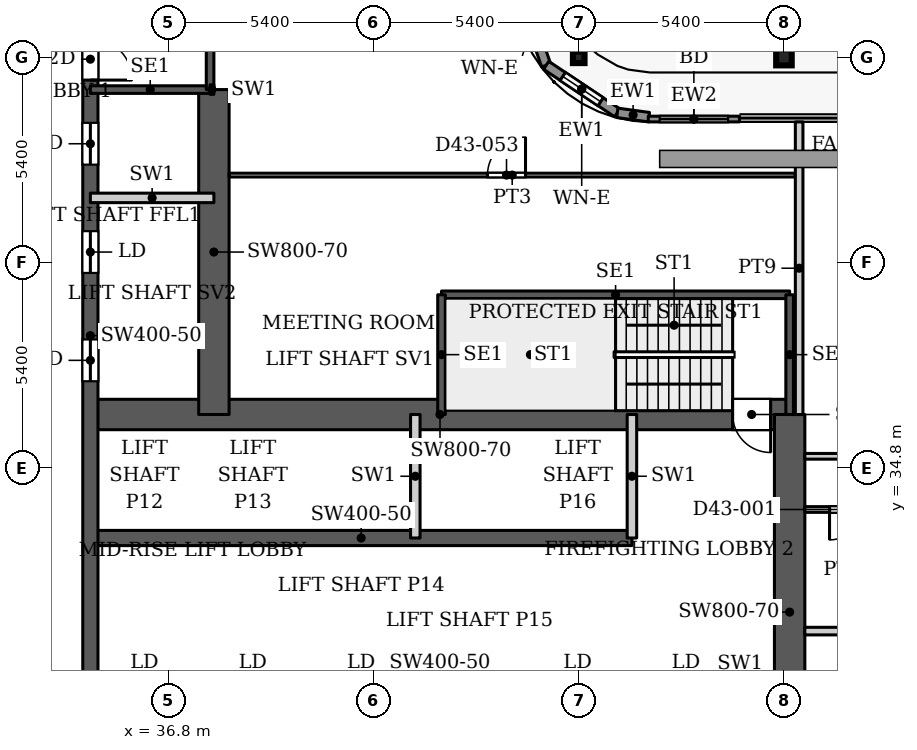
"""IFC4 building model, lengths in metres.
Left out: names, types, materials, properties, quantities, classifications, styles, units other than length and angle.
Written with IfcOpenShell. Run it as: python <this file> out.ifc"""

import sys

from ifc_helpers import new_model, si_unit, direction, frame, frame_2d, origin, origin_2d, place, context, subcontext, project, spatial, rectangle, hollow_rectangle, i_section, extrude, source, transform, mapped, element, fill, save


model = new_model("IFC4")
c1 = context("Model", 3, precision=1e-05, world=origin(), true_north=direction((0.0, 1.0)))
c2 = subcontext(c1, "Body", "Model", "MODEL_VIEW")
j1 = project(units=[si_unit("LENGTHUNIT", "METRE"), si_unit("PLANEANGLEUNIT", "RADIAN")], contexts=[c1])
p1 = place(None, origin())
s1 = spatial("IfcSite", under=j1, at=p1, CompositionType="ELEMENT")
p2 = place(p1, origin())
s2 = spatial("IfcBuilding", under=s1, at=p2, CompositionType="ELEMENT")
p3 = place(p2, frame((0.0, 0.0, 191.6)))
s3 = spatial("IfcBuildingStorey", under=s2, at=p3, CompositionType="ELEMENT", Elevation=191.6)
p4 = place(p3, frame((53.0, 45.6, 0.0), z_axis=(0.0, 0.0, 1.0), x_axis=(1.0, 0.0, 0.0)))
e1 = element("IfcColumn", 1, at=p4, inside=s3, PredefinedType="COLUMN", context=c2, shape_type="SweptSolid", body=[
    extrude(i_section(OverallWidth=0.409, OverallDepth=0.425, WebThickness=0.033, FlangeThickness=0.052, FilletRadius=0.013, at=origin_2d()), origin(), (0.0, 0.0, 1.0), 3.9),
])
p5 = place(p3, frame((47.6, 45.6, 0.0), z_axis=(0.0, 0.0, 1.0), x_axis=(1.0, 0.0, 0.0)))
e2 = element("IfcColumn", 2, at=p5, inside=s3, PredefinedType="COLUMN", context=c2, shape_type="SweptSolid", body=[
    extrude(hollow_rectangle(XDim=0.305, YDim=0.305, WallThickness=0.016, InnerFilletRadius=0.016, OuterFilletRadius=0.032, at=origin_2d()), origin(), (0.0, 0.0, 1.0), 3.9),
])
p6 = place(p3, frame((34.75, 32.95, 0.0), z_axis=(0.0, 0.0, 1.0), x_axis=(1.0, 0.0, 0.0)))
e3 = element("IfcWall", 3, at=p6, inside=s3, PredefinedType="SHEAR", context=c2, shape_type="SweptSolid", body=[
    extrude(rectangle(XDim=14.25, YDim=0.4, at=frame_2d((7.125, 0.0))), origin(), (0.0, 0.0, 1.0), 3.9),
])
p7 = place(p3, frame((34.75, 36.2, 0.0), z_axis=(0.0, 0.0, 1.0), x_axis=(1.0, 0.0, 0.0)))
e4 = element("IfcWall", 4, at=p7, inside=s3, PredefinedType="SHEAR", context=c2, shape_type="SweptSolid", body=[
    extrude(rectangle(XDim=18.4, YDim=0.8, at=frame_2d((9.2, 0.0))), origin(), (0.0, 0.0, 1.0), 3.9),
])
p8 = place(p7, frame((16.9, 0.0, 0.0)))
e5 = element("IfcOpeningElement", 5, at=p8, cuts=e4, PredefinedType="OPENING", context=c2, shape_type="SweptSolid", body=[
    extrude(rectangle(XDim=1.0, YDim=2.2, at=frame_2d((0.5, 1.1))), frame((0.0, 0.41, 0.0), z_axis=(0.0, -1.0, 0.0), x_axis=(1.0, 0.0, 0.0)), (0.0, 0.0, 1.0), 0.82),
])
p9 = place(p3, frame((34.75, 29.05, 0.0), z_axis=(0.0, 0.0, 1.0), x_axis=(0.0, 1.0, 0.0)))
e6 = element("IfcWall", 6, at=p9, inside=s3, PredefinedType="SHEAR", context=c2, shape_type="SweptSolid", body=[
    extrude(rectangle(XDim=18.45, YDim=0.4, at=frame_2d((9.225, 0.0))), origin(), (0.0, 0.0, 1.0), 3.9),
])
p10 = place(p9, frame((8.025, 0.0, 0.0)))
e7 = element("IfcOpeningElement", 7, at=p10, cuts=e6, PredefinedType="OPENING", context=c2, shape_type="SweptSolid", body=[
    extrude(rectangle(XDim=1.1, YDim=2.2, at=frame_2d((0.55, 1.1))), frame((0.0, 0.21, 0.0), z_axis=(0.0, -1.0, 0.0), x_axis=(1.0, 0.0, 0.0)), (0.0, 0.0, 1.0), 0.42),
])
p11 = place(p9, frame((10.875, 0.0, 0.0)))
e8 = element("IfcOpeningElement", 8, at=p11, cuts=e6, PredefinedType="OPENING", context=c2, shape_type="SweptSolid", body=[
    extrude(rectangle(XDim=1.1, YDim=2.2, at=frame_2d((0.55, 1.1))), frame((0.0, 0.21, 0.0), z_axis=(0.0, -1.0, 0.0), x_axis=(1.0, 0.0, 0.0)), (0.0, 0.0, 1.0), 0.42),
])
p12 = place(p9, frame((13.725, 0.0, 0.0)))
e9 = element("IfcOpeningElement", 9, at=p12, cuts=e6, PredefinedType="OPENING", context=c2, shape_type="SweptSolid", body=[
    extrude(rectangle(XDim=1.1, YDim=2.2, at=frame_2d((0.55, 1.1))), frame((0.0, 0.21, 0.0), z_axis=(0.0, -1.0, 0.0), x_axis=(1.0, 0.0, 0.0)), (0.0, 0.0, 1.0), 0.42),
])
p13 = place(p9, frame((15.95, 0.0, 0.0)))
e10 = element("IfcOpeningElement", 10, at=p13, cuts=e6, PredefinedType="OPENING", context=c2, shape_type="SweptSolid", body=[
    extrude(rectangle(XDim=1.1, YDim=2.2, at=frame_2d((0.55, 1.1))), frame((0.0, 0.21, 0.0), z_axis=(0.0, -1.0, 0.0), x_axis=(1.0, 0.0, 0.0)), (0.0, 0.0, 1.0), 0.42),
])
p14 = place(p3, frame((38.0, 36.2, 0.0), z_axis=(0.0, 0.0, 1.0), x_axis=(0.0, 1.0, 0.0)))
e11 = element("IfcWall", 11, at=p14, inside=s3, PredefinedType="SHEAR", context=c2, shape_type="SweptSolid", body=[
    extrude(rectangle(XDim=8.55, YDim=0.8, at=frame_2d((4.275, 0.0))), origin(), (0.0, 0.0, 1.0), 3.9),
])
p15 = place(p3, frame((53.15, 25.8, 0.0), z_axis=(0.0, 0.0, 1.0), x_axis=(0.0, 1.0, 0.0)))
e12 = element("IfcWall", 12, at=p15, inside=s3, PredefinedType="SHEAR", context=c2, shape_type="SweptSolid", body=[
    extrude(rectangle(XDim=10.4, YDim=0.8, at=frame_2d((5.2, 0.0))), origin(), (0.0, 0.0, 1.0), 3.9),
])
p16 = place(p3, frame((46.018, 47.471, 0.0), z_axis=(0.0, 0.0, 1.0), x_axis=(0.328791208903, -0.944402637093, 0.0)))
e13 = element("IfcWall", 13, at=p16, inside=s3, PredefinedType="SOLIDWALL", context=c2, shape_type="SweptSolid", body=[
    extrude(rectangle(XDim=2.205, YDim=0.25, at=frame_2d((1.102, 0.0))), origin(), (0.0, 0.0, 1.0), 3.75),
])
p17 = place(p16, frame((0.503, 0.0, 0.6)))
e14 = element("IfcOpeningElement", 14, at=p17, cuts=e13, PredefinedType="OPENING", context=c2, shape_type="SweptSolid", body=[
    extrude(rectangle(XDim=1.2, YDim=2.1, at=frame_2d((0.6, 1.05))), frame((0.0, 0.135, 0.0), z_axis=(0.0, -1.0, 0.0), x_axis=(1.0, 0.0, 0.0)), (0.0, 0.0, 1.0), 0.27),
])
p18 = place(p3, frame((46.743, 45.389, 0.0), z_axis=(0.0, 0.0, 1.0), x_axis=(0.831449265529, -0.555600682912, 0.0)))
e15 = element("IfcWall", 15, at=p18, inside=s3, PredefinedType="SOLIDWALL", context=c2, shape_type="SweptSolid", body=[
    extrude(rectangle(XDim=2.251, YDim=0.25, at=frame_2d((1.126, 0.0))), origin(), (0.0, 0.0, 1.0), 3.75),
])
p19 = place(p18, frame((0.525, 0.0, 0.6)))
e16 = element("IfcOpeningElement", 16, at=p19, cuts=e15, PredefinedType="OPENING", context=c2, shape_type="SweptSolid", body=[
    extrude(rectangle(XDim=1.2, YDim=2.1, at=frame_2d((0.6, 1.05))), frame((0.0, 0.135, 0.0), z_axis=(0.0, -1.0, 0.0), x_axis=(1.0, 0.0, 0.0)), (0.0, 0.0, 1.0), 0.27),
])
p20 = place(p3, frame((48.615, 44.138, 0.0), z_axis=(0.0, 0.0, 1.0), x_axis=(0.990741504246, -0.135761819977, 0.0)))
e17 = element("IfcWall", 17, at=p20, inside=s3, PredefinedType="SOLIDWALL", context=c2, shape_type="SweptSolid", body=[
    extrude(rectangle(XDim=0.84, YDim=0.25, at=frame_2d((0.42, 0.0))), origin(), (0.0, 0.0, 1.0), 3.75),
])
p21 = place(p3, frame((49.43, 43.975, 0.0), z_axis=(0.0, 0.0, 1.0), x_axis=(1.0, 0.0, 0.0)))
e18 = element("IfcWall", 18, at=p21, inside=s3, PredefinedType="SOLIDWALL", context=c2, shape_type="SweptSolid", body=[
    extrude(rectangle(XDim=2.4, YDim=0.15, at=frame_2d((1.2, 0.0))), origin(), (0.0, 0.0, 1.0), 3.75),
])
p22 = place(p21, frame((0.3, 0.0, 0.0)))
e19 = element("IfcOpeningElement", 19, at=p22, cuts=e18, PredefinedType="OPENING", context=c2, shape_type="SweptSolid", body=[
    extrude(rectangle(XDim=1.8, YDim=2.4, at=frame_2d((0.9, 1.2))), frame((0.0, 0.085, 0.0), z_axis=(0.0, -1.0, 0.0), x_axis=(1.0, 0.0, 0.0)), (0.0, 0.0, 1.0), 0.17),
])
p23 = place(p3, frame((43.99, 39.35, 0.0), z_axis=(0.0, 0.0, 1.0), x_axis=(1.0, 0.0, 0.0)))
e20 = element("IfcWall", 20, at=p23, inside=s3, PredefinedType="SHEAR", context=c2, shape_type="SweptSolid", body=[
    extrude(rectangle(XDim=9.16, YDim=0.2, at=frame_2d((4.58, 0.0))), origin(), (0.0, 0.0, 1.0), 3.9),
])
for number, where, z_axis, x_axis in (
    (21, (43.99, 36.2, 0.0), (0.0, 0.0, 1.0), (0.0, 1.0, 0.0)),
    (22, (53.15, 36.2, 0.0), (0.0, 0.0, 1.0), (0.0, 1.0, 0.0)),
):
    element("IfcWall", number, at=place(p3, frame(where, z_axis=z_axis, x_axis=x_axis)), inside=s3, PredefinedType="SHEAR", context=c2, shape_type="SweptSolid", body=[
        extrude(rectangle(XDim=3.15, YDim=0.2, at=frame_2d((1.575, 0.0))), origin(), (0.0, 0.0, 1.0), 3.9),
    ])
p24 = place(p3, frame((34.75, 44.75, 0.0), z_axis=(0.0, 0.0, 1.0), x_axis=(1.0, 0.0, 0.0)))
e23 = element("IfcWall", 23, at=p24, inside=s3, PredefinedType="SHEAR", context=c2, shape_type="SweptSolid", body=[
    extrude(rectangle(XDim=3.15, YDim=0.2, at=frame_2d((1.575, 0.0))), origin(), (0.0, 0.0, 1.0), 3.9),
])
p25 = place(p3, frame((37.9, 44.75, 0.0), z_axis=(0.0, 0.0, 1.0), x_axis=(0.0, 1.0, 0.0)))
e24 = element("IfcWall", 24, at=p25, inside=s3, PredefinedType="SHEAR", context=c2, shape_type="SweptSolid", body=[
    extrude(rectangle(XDim=9.16, YDim=0.2, at=frame_2d((4.58, 0.0))), origin(), (0.0, 0.0, 1.0), 3.9),
])
for number, where, z_axis, x_axis in (
    (25, (43.3, 32.95, 0.0), (0.0, 0.0, 1.0), (0.0, 1.0, 0.0)),
    (26, (49.0, 32.95, 0.0), (0.0, 0.0, 1.0), (0.0, 1.0, 0.0)),
    (27, (34.75, 41.9, 0.0), (0.0, 0.0, 1.0), (1.0, 0.0, 0.0)),
):
    element("IfcWall", number, at=place(p3, frame(where, z_axis=z_axis, x_axis=x_axis)), inside=s3, PredefinedType="PARTITIONING", context=c2, shape_type="SweptSolid", body=[
        extrude(rectangle(XDim=3.25, YDim=0.25, at=frame_2d((1.625, 0.0))), origin(), (0.0, 0.0, 1.0), 3.9),
    ])
p26 = place(p3, frame((37.9, 44.75, 0.0), z_axis=(0.0, 0.0, 1.0), x_axis=(1.0, 0.0, 0.0)))
e28 = element("IfcWall", 28, at=p26, inside=s3, PredefinedType="PARTITIONING", context=c2, shape_type="SweptSolid", body=[
    extrude(rectangle(XDim=0.1, YDim=0.25, at=frame_2d((0.05, 0.0))), origin(), (0.0, 0.0, 1.0), 3.9),
])
p27 = place(p3, frame((38.399, 42.5, 0.0), z_axis=(0.0, 0.0, 1.0), x_axis=(1.0, 0.0, 0.0)))
e29 = element("IfcWall", 29, at=p27, inside=s3, PredefinedType="PARTITIONING", context=c2, shape_type="SweptSolid", body=[
    extrude(rectangle(XDim=14.901, YDim=0.1, at=frame_2d((7.451, 0.0))), origin(), (0.0, 0.0, 1.0), 3.6),
])
p28 = place(p27, frame((6.801, 0.0, 0.0)))
e30 = element("IfcOpeningElement", 30, at=p28, cuts=e29, PredefinedType="OPENING", context=c2, shape_type="SweptSolid", body=[
    extrude(rectangle(XDim=1.0, YDim=2.1, at=frame_2d((0.5, 1.05))), frame((0.0, 0.06, 0.0), z_axis=(0.0, -1.0, 0.0), x_axis=(1.0, 0.0, 0.0)), (0.0, 0.0, 1.0), 0.12),
])
p29 = place(p3, frame((53.4, 36.199, 0.0), z_axis=(0.0, 0.0, 1.0), x_axis=(0.0, 1.0, 0.0)))
e31 = element("IfcWall", 31, at=p29, inside=s3, PredefinedType="PARTITIONING", context=c2, shape_type="SweptSolid", body=[
    extrude(rectangle(XDim=7.701, YDim=0.2, at=frame_2d((3.851, 0.0))), origin(), (0.0, 0.0, 1.0), 3.6),
])
p30 = place(p3, frame((53.549, 30.5, 0.0), z_axis=(0.0, 0.0, 1.0), x_axis=(1.0, 0.0, 0.0)))
e32 = element("IfcWall", 32, at=p30, inside=s3, PredefinedType="PARTITIONING", context=c2, shape_type="SweptSolid", body=[
    extrude(rectangle(XDim=44.551, YDim=0.2, at=frame_2d((22.275, 0.0))), origin(), (0.0, 0.0, 1.0), 3.6),
])
p31 = place(p30, frame((8.351, 0.0, 0.0)))
e33 = element("IfcOpeningElement", 33, at=p31, cuts=e32, PredefinedType="OPENING", context=c2, shape_type="SweptSolid", body=[
    extrude(rectangle(XDim=1.0, YDim=2.1, at=frame_2d((0.5, 1.05))), frame((0.0, 0.11, 0.0), z_axis=(0.0, -1.0, 0.0), x_axis=(1.0, 0.0, 0.0)), (0.0, 0.0, 1.0), 0.22),
])
p32 = place(p30, frame((12.551, 0.0, 0.0)))
e34 = element("IfcOpeningElement", 34, at=p32, cuts=e32, PredefinedType="OPENING", context=c2, shape_type="SweptSolid", body=[
    extrude(rectangle(XDim=1.0, YDim=2.1, at=frame_2d((0.5, 1.05))), frame((0.0, 0.11, 0.0), z_axis=(0.0, -1.0, 0.0), x_axis=(1.0, 0.0, 0.0)), (0.0, 0.0, 1.0), 0.22),
])
p33 = place(p30, frame((28.751, 0.0, 0.0)))
e35 = element("IfcOpeningElement", 35, at=p33, cuts=e32, PredefinedType="OPENING", context=c2, shape_type="SweptSolid", body=[
    extrude(rectangle(XDim=1.0, YDim=2.1, at=frame_2d((0.5, 1.05))), frame((0.0, 0.11, 0.0), z_axis=(0.0, -1.0, 0.0), x_axis=(1.0, 0.0, 0.0)), (0.0, 0.0, 1.0), 0.22),
])
p34 = place(p30, frame((40.751, 0.0, 0.0)))
e36 = element("IfcOpeningElement", 36, at=p34, cuts=e32, PredefinedType="OPENING", context=c2, shape_type="SweptSolid", body=[
    extrude(rectangle(XDim=1.0, YDim=2.1, at=frame_2d((0.5, 1.05))), frame((0.0, 0.11, 0.0), z_axis=(0.0, -1.0, 0.0), x_axis=(1.0, 0.0, 0.0)), (0.0, 0.0, 1.0), 0.22),
])
p35 = place(p3, frame((53.549, 33.7, 0.0), z_axis=(0.0, 0.0, 1.0), x_axis=(1.0, 0.0, 0.0)))
e37 = element("IfcWall", 37, at=p35, inside=s3, PredefinedType="PARTITIONING", context=c2, shape_type="SweptSolid", body=[
    extrude(rectangle(XDim=7.701, YDim=0.15, at=frame_2d((3.851, 0.0))), origin(), (0.0, 0.0, 1.0), 3.6),
])
p36 = place(p35, frame((0.651, 0.0, 0.0)))
e38 = element("IfcOpeningElement", 38, at=p36, cuts=e37, PredefinedType="OPENING", context=c2, shape_type="SweptSolid", body=[
    extrude(rectangle(XDim=0.8, YDim=2.1, at=frame_2d((0.4, 1.05))), frame((0.0, 0.085, 0.0), z_axis=(0.0, -1.0, 0.0), x_axis=(1.0, 0.0, 0.0)), (0.0, 0.0, 1.0), 0.17),
])
p37 = place(p35, frame((5.401, 0.0, 0.0)))
e39 = element("IfcOpeningElement", 39, at=p37, cuts=e37, PredefinedType="OPENING", context=c2, shape_type="SweptSolid", body=[
    extrude(rectangle(XDim=0.9, YDim=2.1, at=frame_2d((0.45, 1.05))), frame((0.0, 0.085, 0.0), z_axis=(0.0, -1.0, 0.0), x_axis=(1.0, 0.0, 0.0)), (0.0, 0.0, 1.0), 0.17),
])
p38 = place(p35, frame((2.751, 0.0, 0.0)))
e40 = element("IfcOpeningElement", 40, at=p38, cuts=e37, PredefinedType="OPENING", context=c2, shape_type="SweptSolid", body=[
    extrude(rectangle(XDim=0.8, YDim=2.1, at=frame_2d((0.4, 1.05))), frame((0.0, 0.085, 0.0), z_axis=(0.0, -1.0, 0.0), x_axis=(1.0, 0.0, 0.0)), (0.0, 0.0, 1.0), 0.17),
])
p39 = place(p3, frame((53.549, 35.1, 0.0), z_axis=(0.0, 0.0, 1.0), x_axis=(1.0, 0.0, 0.0)))
e41 = element("IfcWall", 41, at=p39, inside=s3, PredefinedType="PARTITIONING", context=c2, shape_type="SweptSolid", body=[
    extrude(rectangle(XDim=11.751, YDim=0.15, at=frame_2d((5.875, 0.0))), origin(), (0.0, 0.0, 1.0), 3.6),
])
p40 = place(p39, frame((5.551, 0.0, 0.0)))
e42 = element("IfcOpeningElement", 42, at=p40, cuts=e41, PredefinedType="OPENING", context=c2, shape_type="SweptSolid", body=[
    extrude(rectangle(XDim=0.9, YDim=2.1, at=frame_2d((0.45, 1.05))), frame((0.0, 0.085, 0.0), z_axis=(0.0, -1.0, 0.0), x_axis=(1.0, 0.0, 0.0)), (0.0, 0.0, 1.0), 0.17),
])
p41 = place(p39, frame((1.751, 0.0, 0.0)))
e43 = element("IfcOpeningElement", 43, at=p41, cuts=e41, PredefinedType="OPENING", context=c2, shape_type="SweptSolid", body=[
    extrude(rectangle(XDim=1.0, YDim=2.1, at=frame_2d((0.5, 1.05))), frame((0.0, 0.085, 0.0), z_axis=(0.0, -1.0, 0.0), x_axis=(1.0, 0.0, 0.0)), (0.0, 0.0, 1.0), 0.17),
])
p42 = place(p39, frame((8.101, 0.0, 0.0)))
e44 = element("IfcOpeningElement", 44, at=p42, cuts=e41, PredefinedType="OPENING", context=c2, shape_type="SweptSolid", body=[
    extrude(rectangle(XDim=0.9, YDim=2.1, at=frame_2d((0.45, 1.05))), frame((0.0, 0.085, 0.0), z_axis=(0.0, -1.0, 0.0), x_axis=(1.0, 0.0, 0.0)), (0.0, 0.0, 1.0), 0.17),
])
m1 = source(origin(), c2, "Body", "SweptSolid", [
    extrude(rectangle(XDim=1.2, YDim=2.1, at=frame_2d((0.6, 1.05))), frame((0.0, 0.03, 0.0), z_axis=(0.0, -1.0, 0.0), x_axis=(1.0, 0.0, 0.0)), (0.0, 0.0, 1.0), 0.06),
])
p43 = place(p19, origin())
e45 = element("IfcWindow", 45, at=p43, inside=s3, PartitioningType="SINGLE_PANEL", PredefinedType="WINDOW", context=c2, shape_type="MappedRepresentation", body=[
    mapped(m1, transform((0.0, 0.0, 0.0), x_axis=(1.0, 0.0, 0.0), y_axis=(0.0, 1.0, 0.0), z_axis=(0.0, 0.0, 1.0), scale=1.0)),
])
fill(e16, e45)
m2 = source(origin(), c2, "Body", "SweptSolid", [
    extrude(rectangle(XDim=1.8, YDim=2.4, at=frame_2d((0.9, 1.2))), frame((0.0, 0.025, 0.0), z_axis=(0.0, -1.0, 0.0), x_axis=(1.0, 0.0, 0.0)), (0.0, 0.0, 1.0), 0.05),
])
p44 = place(p22, origin())
e46 = element("IfcDoor", 46, at=p44, inside=s3, OperationType="SLIDING_TO_LEFT", PredefinedType="DOOR", context=c2, shape_type="MappedRepresentation", body=[
    mapped(m2, transform((0.0, 0.0, 0.0), x_axis=(1.0, 0.0, 0.0), y_axis=(0.0, 1.0, 0.0), z_axis=(0.0, 0.0, 1.0), scale=1.0)),
])
fill(e19, e46)
m3 = source(origin(), c2, "Body", "SweptSolid", [
    extrude(rectangle(XDim=1.1, YDim=2.2, at=frame_2d((0.55, 1.1))), frame((0.0, 0.025, 0.0), z_axis=(0.0, -1.0, 0.0), x_axis=(1.0, 0.0, 0.0)), (0.0, 0.0, 1.0), 0.05),
])
p45 = place(p10, origin())
e47 = element("IfcDoor", 47, at=p45, inside=s3, OperationType="SLIDING_TO_LEFT", PredefinedType="DOOR", context=c2, shape_type="MappedRepresentation", body=[
    mapped(m3, transform((0.0, 0.0, 0.0), x_axis=(1.0, 0.0, 0.0), y_axis=(0.0, 1.0, 0.0), z_axis=(0.0, 0.0, 1.0), scale=1.0)),
])
fill(e7, e47)
p46 = place(p11, origin())
e48 = element("IfcDoor", 48, at=p46, inside=s3, OperationType="SLIDING_TO_LEFT", PredefinedType="DOOR", context=c2, shape_type="MappedRepresentation", body=[
    mapped(m3, transform((0.0, 0.0, 0.0), x_axis=(1.0, 0.0, 0.0), y_axis=(0.0, 1.0, 0.0), z_axis=(0.0, 0.0, 1.0), scale=1.0)),
])
fill(e8, e48)
p47 = place(p12, origin())
e49 = element("IfcDoor", 49, at=p47, inside=s3, OperationType="SLIDING_TO_LEFT", PredefinedType="DOOR", context=c2, shape_type="MappedRepresentation", body=[
    mapped(m3, transform((0.0, 0.0, 0.0), x_axis=(1.0, 0.0, 0.0), y_axis=(0.0, 1.0, 0.0), z_axis=(0.0, 0.0, 1.0), scale=1.0)),
])
fill(e9, e49)
m4 = source(origin(), c2, "Body", "SweptSolid", [
    extrude(rectangle(XDim=1.0, YDim=2.2, at=frame_2d((0.5, 1.1))), frame((0.0, 0.025, 0.0), z_axis=(0.0, -1.0, 0.0), x_axis=(1.0, 0.0, 0.0)), (0.0, 0.0, 1.0), 0.05),
])
p48 = place(p8, origin())
e50 = element("IfcDoor", 50, at=p48, inside=s3, OperationType="SINGLE_SWING_RIGHT", PredefinedType="DOOR", context=c2, shape_type="MappedRepresentation", body=[
    mapped(m4, transform((0.0, 0.0, 0.0), x_axis=(1.0, 0.0, 0.0), y_axis=(0.0, 1.0, 0.0), z_axis=(0.0, 0.0, 1.0), scale=1.0)),
])
fill(e5, e50)
m5 = source(origin(), c2, "Body", "SweptSolid", [
    extrude(rectangle(XDim=1.1, YDim=2.2, at=frame_2d((0.55, 1.1))), frame((0.0, 0.025, 0.0), z_axis=(0.0, -1.0, 0.0), x_axis=(1.0, 0.0, 0.0)), (0.0, 0.0, 1.0), 0.05),
])
p49 = place(p13, origin())
e51 = element("IfcDoor", 51, at=p49, inside=s3, OperationType="SINGLE_SWING_RIGHT", PredefinedType="DOOR", context=c2, shape_type="MappedRepresentation", body=[
    mapped(m5, transform((0.0, 0.0, 0.0), x_axis=(1.0, 0.0, 0.0), y_axis=(0.0, 1.0, 0.0), z_axis=(0.0, 0.0, 1.0), scale=1.0)),
])
fill(e10, e51)
m6 = source(origin(), c2, "Body", "SweptSolid", [
    extrude(rectangle(XDim=0.8, YDim=2.1, at=frame_2d((0.4, 1.05))), frame((0.0, 0.025, 0.0), z_axis=(0.0, -1.0, 0.0), x_axis=(1.0, 0.0, 0.0)), (0.0, 0.0, 1.0), 0.05),
])
p50 = place(p36, origin())
e52 = element("IfcDoor", 52, at=p50, inside=s3, OperationType="SINGLE_SWING_RIGHT", PredefinedType="DOOR", context=c2, shape_type="MappedRepresentation", body=[
    mapped(m6, transform((0.0, 0.0, 0.0), x_axis=(1.0, 0.0, 0.0), y_axis=(0.0, 1.0, 0.0), z_axis=(0.0, 0.0, 1.0), scale=1.0)),
])
fill(e38, e52)
m7 = source(origin(), c2, "Body", "SweptSolid", [
    extrude(rectangle(XDim=1.0, YDim=2.1, at=frame_2d((0.5, 1.05))), frame((0.0, 0.025, 0.0), z_axis=(0.0, -1.0, 0.0), x_axis=(1.0, 0.0, 0.0)), (0.0, 0.0, 1.0), 0.05),
])
p51 = place(p28, origin())
e53 = element("IfcDoor", 53, at=p51, inside=s3, OperationType="SINGLE_SWING_LEFT", PredefinedType="DOOR", context=c2, shape_type="MappedRepresentation", body=[
    mapped(m7, transform((0.0, 0.0, 0.0), x_axis=(1.0, 0.0, 0.0), y_axis=(0.0, 1.0, 0.0), z_axis=(0.0, 0.0, 1.0), scale=1.0)),
])
fill(e30, e53)
save(model, sys.argv[1])
